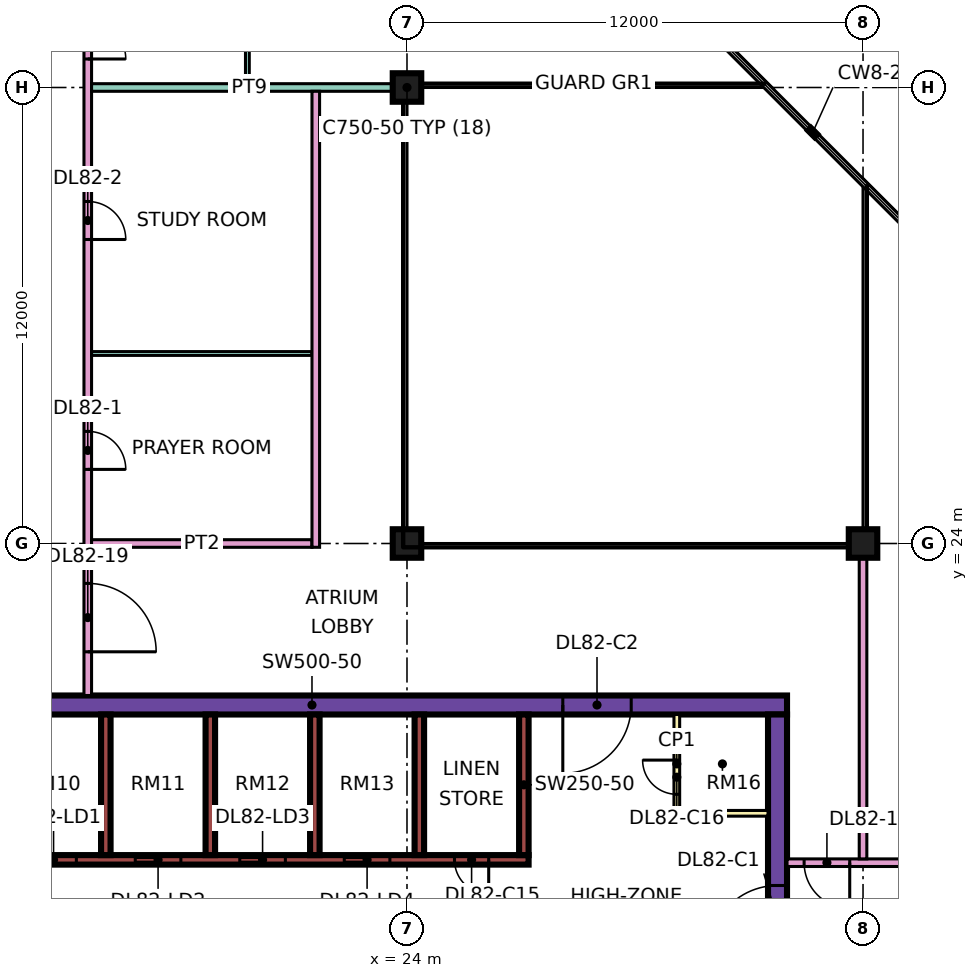
"""IFC4 building model, lengths in metres.
Left out: names, types, materials, properties, quantities, classifications, styles, units other than length and angle.
Written with IfcOpenShell. Run it as: python <this file> out.ifc"""

import sys

from ifc_helpers import new_model, si_unit, direction, frame, frame_2d, origin, origin_2d, place, context, subcontext, project, spatial, rectangle, extrude, element, fill, save


model = new_model("IFC4")
c1 = context("Model", 3, precision=1e-05, world=origin(), true_north=direction((0.0, 1.0)))
c2 = subcontext(c1, "Body", "Model", "MODEL_VIEW")
j1 = project(units=[si_unit("LENGTHUNIT", "METRE"), si_unit("PLANEANGLEUNIT", "RADIAN")], contexts=[c1])
p1 = place(None, origin())
s1 = spatial("IfcSite", under=j1, at=p1, CompositionType="ELEMENT")
p2 = place(p1, origin())
s2 = spatial("IfcBuilding", under=s1, at=p2, CompositionType="ELEMENT")
p3 = place(p2, frame((0.0, 0.0, 353.9)))
s3 = spatial("IfcBuildingStorey", under=s2, at=p3, CompositionType="ELEMENT", Elevation=353.9)
for number, where, z_axis, x_axis in (
    (1, (24.0, 24.0, 0.0), (0.0, 0.0, 1.0), (1.0, 0.0, 0.0)),
    (2, (24.0, 36.0, 0.0), (0.0, 0.0, 1.0), (1.0, 0.0, 0.0)),
    (3, (36.0, 24.0, 0.0), (0.0, 0.0, 1.0), (1.0, 0.0, 0.0)),
):
    element("IfcColumn", number, at=place(p3, frame(where, z_axis=z_axis, x_axis=x_axis)), inside=s3, PredefinedType="COLUMN", context=c2, shape_type="SweptSolid", body=[
        extrude(rectangle(XDim=0.75, YDim=0.75, at=origin_2d()), origin(), (0.0, 0.0, 1.0), 3.75),
    ])
p4 = place(p3, frame((9.0, 19.75, 0.0), z_axis=(0.0, 0.0, 1.0), x_axis=(1.0, 0.0, 0.0)))
e4 = element("IfcWall", 4, at=p4, inside=s3, PredefinedType="SHEAR", context=c2, shape_type="SweptSolid", body=[
    extrude(rectangle(XDim=25.0, YDim=0.5, at=frame_2d((12.5, 0.0))), origin(), (0.0, 0.0, 1.0), 3.75),
])
p5 = place(p4, frame((19.1, 0.0, 0.0)))
e5 = element("IfcOpeningElement", 5, at=p5, cuts=e4, PredefinedType="OPENING", context=c2, shape_type="SweptSolid", body=[
    extrude(rectangle(XDim=1.8, YDim=2.4, at=frame_2d((0.9, 1.2))), frame((0.0, 0.26, 0.0), z_axis=(0.0, -1.0, 0.0), x_axis=(1.0, 0.0, 0.0)), (0.0, 0.0, 1.0), 0.52),
])
p6 = place(p3, frame((33.75, 7.5, 0.0), z_axis=(0.0, 0.0, 1.0), x_axis=(0.0, 1.0, 0.0)))
e6 = element("IfcWall", 6, at=p6, inside=s3, PredefinedType="SHEAR", context=c2, shape_type="SweptSolid", body=[
    extrude(rectangle(XDim=12.0, YDim=0.5, at=frame_2d((6.0, 0.0))), origin(), (0.0, 0.0, 1.0), 3.75),
])
p7 = place(p6, frame((5.7, 0.0, 0.0)))
e7 = element("IfcOpeningElement", 7, at=p7, cuts=e6, PredefinedType="OPENING", context=c2, shape_type="SweptSolid", body=[
    extrude(rectangle(XDim=1.8, YDim=2.4, at=frame_2d((0.9, 1.2))), frame((0.0, 0.26, 0.0), z_axis=(0.0, -1.0, 0.0), x_axis=(1.0, 0.0, 0.0)), (0.0, 0.0, 1.0), 0.52),
])
p8 = place(p3, frame((13.45, 15.675, 0.0), z_axis=(0.0, 0.0, 1.0), x_axis=(1.0, 0.0, 0.0)))
e8 = element("IfcWall", 8, at=p8, inside=s3, PredefinedType="SHEAR", context=c2, shape_type="SweptSolid", body=[
    extrude(rectangle(XDim=13.75, YDim=0.25, at=frame_2d((6.875, 0.0))), origin(), (0.0, 0.0, 1.0), 3.75),
])
p9 = place(p8, frame((0.65, 0.0, 0.0)))
e9 = element("IfcOpeningElement", 9, at=p9, cuts=e8, PredefinedType="OPENING", context=c2, shape_type="SweptSolid", body=[
    extrude(rectangle(XDim=1.2, YDim=2.2, at=frame_2d((0.6, 1.1))), frame((0.0, 0.135, 0.0), z_axis=(0.0, -1.0, 0.0), x_axis=(1.0, 0.0, 0.0)), (0.0, 0.0, 1.0), 0.27),
])
p10 = place(p8, frame((3.4, 0.0, 0.0)))
e10 = element("IfcOpeningElement", 10, at=p10, cuts=e8, PredefinedType="OPENING", context=c2, shape_type="SweptSolid", body=[
    extrude(rectangle(XDim=1.2, YDim=2.2, at=frame_2d((0.6, 1.1))), frame((0.0, 0.135, 0.0), z_axis=(0.0, -1.0, 0.0), x_axis=(1.0, 0.0, 0.0)), (0.0, 0.0, 1.0), 0.27),
])
p11 = place(p8, frame((6.15, 0.0, 0.0)))
e11 = element("IfcOpeningElement", 11, at=p11, cuts=e8, PredefinedType="OPENING", context=c2, shape_type="SweptSolid", body=[
    extrude(rectangle(XDim=1.2, YDim=2.2, at=frame_2d((0.6, 1.1))), frame((0.0, 0.135, 0.0), z_axis=(0.0, -1.0, 0.0), x_axis=(1.0, 0.0, 0.0)), (0.0, 0.0, 1.0), 0.27),
])
p12 = place(p8, frame((8.9, 0.0, 0.0)))
e12 = element("IfcOpeningElement", 12, at=p12, cuts=e8, PredefinedType="OPENING", context=c2, shape_type="SweptSolid", body=[
    extrude(rectangle(XDim=1.2, YDim=2.2, at=frame_2d((0.6, 1.1))), frame((0.0, 0.135, 0.0), z_axis=(0.0, -1.0, 0.0), x_axis=(1.0, 0.0, 0.0)), (0.0, 0.0, 1.0), 0.27),
])
p13 = place(p8, frame((11.8, 0.0, 0.0)))
e13 = element("IfcOpeningElement", 13, at=p13, cuts=e8, PredefinedType="OPENING", context=c2, shape_type="SweptSolid", body=[
    extrude(rectangle(XDim=0.9, YDim=2.1, at=frame_2d((0.45, 1.05))), frame((0.0, 0.135, 0.0), z_axis=(0.0, -1.0, 0.0), x_axis=(1.0, 0.0, 0.0)), (0.0, 0.0, 1.0), 0.27),
])
for number, where, z_axis, x_axis in (
    (14, (16.075, 15.8, 0.0), (0.0, 0.0, 1.0), (0.0, 1.0, 0.0)),
    (15, (18.825, 15.8, 0.0), (0.0, 0.0, 1.0), (0.0, 1.0, 0.0)),
    (16, (21.575, 15.8, 0.0), (0.0, 0.0, 1.0), (0.0, 1.0, 0.0)),
    (17, (24.325, 15.8, 0.0), (0.0, 0.0, 1.0), (0.0, 1.0, 0.0)),
    (18, (27.075, 15.8, 0.0), (0.0, 0.0, 1.0), (0.0, 1.0, 0.0)),
):
    element("IfcWall", number, at=place(p3, frame(where, z_axis=z_axis, x_axis=x_axis)), inside=s3, PredefinedType="SHEAR", context=c2, shape_type="SweptSolid", body=[
        extrude(rectangle(XDim=3.7, YDim=0.25, at=frame_2d((1.85, 0.0))), origin(), (0.0, 0.0, 1.0), 3.75),
    ])
p14 = place(p3, frame((31.1, 16.9, 0.0), z_axis=(0.0, 0.0, 1.0), x_axis=(0.0, 1.0, 0.0)))
e19 = element("IfcWall", 19, at=p14, inside=s3, PredefinedType="PARTITIONING", context=c2, shape_type="SweptSolid", body=[
    extrude(rectangle(XDim=2.6, YDim=0.15, at=frame_2d((1.3, 0.0))), origin(), (0.0, 0.0, 1.0), 3.35),
])
p15 = place(p14, frame((0.5, 0.0, 0.0)))
e20 = element("IfcOpeningElement", 20, at=p15, cuts=e19, PredefinedType="OPENING", context=c2, shape_type="SweptSolid", body=[
    extrude(rectangle(XDim=0.9, YDim=2.1, at=frame_2d((0.45, 1.05))), frame((0.0, 0.085, 0.0), z_axis=(0.0, -1.0, 0.0), x_axis=(1.0, 0.0, 0.0)), (0.0, 0.0, 1.0), 0.17),
])
p16 = place(p3, frame((31.1, 16.9, 0.0), z_axis=(0.0, 0.0, 1.0), x_axis=(1.0, 0.0, 0.0)))
e21 = element("IfcWall", 21, at=p16, inside=s3, PredefinedType="PARTITIONING", context=c2, shape_type="SweptSolid", body=[
    extrude(rectangle(XDim=2.4, YDim=0.15, at=frame_2d((1.2, 0.0))), origin(), (0.0, 0.0, 1.0), 3.35),
])
p17 = place(p3, frame((15.6, 20.0, 0.0), z_axis=(0.0, 0.0, 1.0), x_axis=(0.0, 1.0, 0.0)))
e22 = element("IfcWall", 22, at=p17, inside=s3, PredefinedType="PARTITIONING", context=c2, shape_type="SweptSolid", body=[
    extrude(rectangle(XDim=27.775, YDim=0.2, at=frame_2d((13.887, 0.0))), origin(), (0.0, 0.0, 1.0), 3.35),
])
p18 = place(p17, frame((5.95, 0.0, 0.0)))
e23 = element("IfcOpeningElement", 23, at=p18, cuts=e22, PredefinedType="OPENING", context=c2, shape_type="SweptSolid", body=[
    extrude(rectangle(XDim=1.0, YDim=2.1, at=frame_2d((0.5, 1.05))), frame((0.0, 0.11, 0.0), z_axis=(0.0, -1.0, 0.0), x_axis=(1.0, 0.0, 0.0)), (0.0, 0.0, 1.0), 0.22),
])
p19 = place(p17, frame((12.0, 0.0, 0.0)))
e24 = element("IfcOpeningElement", 24, at=p19, cuts=e22, PredefinedType="OPENING", context=c2, shape_type="SweptSolid", body=[
    extrude(rectangle(XDim=1.0, YDim=2.1, at=frame_2d((0.5, 1.05))), frame((0.0, 0.11, 0.0), z_axis=(0.0, -1.0, 0.0), x_axis=(1.0, 0.0, 0.0)), (0.0, 0.0, 1.0), 0.22),
])
p20 = place(p17, frame((16.75, 0.0, 0.0)))
e25 = element("IfcOpeningElement", 25, at=p20, cuts=e22, PredefinedType="OPENING", context=c2, shape_type="SweptSolid", body=[
    extrude(rectangle(XDim=1.0, YDim=2.1, at=frame_2d((0.5, 1.05))), frame((0.0, 0.11, 0.0), z_axis=(0.0, -1.0, 0.0), x_axis=(1.0, 0.0, 0.0)), (0.0, 0.0, 1.0), 0.22),
])
p21 = place(p17, frame((1.15, 0.0, 0.0)))
e26 = element("IfcOpeningElement", 26, at=p21, cuts=e22, PredefinedType="OPENING", context=c2, shape_type="SweptSolid", body=[
    extrude(rectangle(XDim=1.8, YDim=2.1, at=frame_2d((0.9, 1.05))), frame((0.0, 0.11, 0.0), z_axis=(0.0, -1.0, 0.0), x_axis=(1.0, 0.0, 0.0)), (0.0, 0.0, 1.0), 0.22),
])
p22 = place(p17, frame((25.9, 0.0, 0.0)))
e27 = element("IfcOpeningElement", 27, at=p22, cuts=e22, PredefinedType="OPENING", context=c2, shape_type="SweptSolid", body=[
    extrude(rectangle(XDim=1.0, YDim=2.1, at=frame_2d((0.5, 1.05))), frame((0.0, 0.11, 0.0), z_axis=(0.0, -1.0, 0.0), x_axis=(1.0, 0.0, 0.0)), (0.0, 0.0, 1.0), 0.22),
])
p23 = place(p3, frame((15.7, 24.0, 0.0), z_axis=(0.0, 0.0, 1.0), x_axis=(1.0, 0.0, 0.0)))
e28 = element("IfcWall", 28, at=p23, inside=s3, PredefinedType="PARTITIONING", context=c2, shape_type="SweptSolid", body=[
    extrude(rectangle(XDim=5.8, YDim=0.2, at=frame_2d((2.9, 0.0))), origin(), (0.0, 0.0, 1.0), 3.35),
])
p24 = place(p3, frame((15.7, 29.0, 0.0), z_axis=(0.0, 0.0, 1.0), x_axis=(1.0, 0.0, 0.0)))
e29 = element("IfcWall", 29, at=p24, inside=s3, PredefinedType="PARTITIONING", context=c2, shape_type="SweptSolid", body=[
    extrude(rectangle(XDim=5.8, YDim=0.1, at=frame_2d((2.9, 0.0))), origin(), (0.0, 0.0, 1.0), 3.35),
])
p25 = place(p3, frame((15.7, 36.0, 0.0), z_axis=(0.0, 0.0, 1.0), x_axis=(1.0, 0.0, 0.0)))
e30 = element("IfcWall", 30, at=p25, inside=s3, PredefinedType="PARTITIONING", context=c2, shape_type="SweptSolid", body=[
    extrude(rectangle(XDim=8.3, YDim=0.2, at=frame_2d((4.15, 0.0))), origin(), (0.0, 0.0, 1.0), 3.35),
])
p26 = place(p3, frame((19.8, 36.1, 0.0), z_axis=(0.0, 0.0, 1.0), x_axis=(0.0, 1.0, 0.0)))
e31 = element("IfcWall", 31, at=p26, inside=s3, PredefinedType="PARTITIONING", context=c2, shape_type="SweptSolid", body=[
    extrude(rectangle(XDim=2.85, YDim=0.1, at=frame_2d((1.425, 0.0))), origin(), (0.0, 0.0, 1.0), 3.35),
])
p27 = place(p3, frame((21.6, 23.9, 0.0), z_axis=(0.0, 0.0, 1.0), x_axis=(0.0, 1.0, 0.0)))
e32 = element("IfcWall", 32, at=p27, inside=s3, PredefinedType="PARTITIONING", context=c2, shape_type="SweptSolid", body=[
    extrude(rectangle(XDim=12.0, YDim=0.2, at=frame_2d((6.0, 0.0))), origin(), (0.0, 0.0, 1.0), 3.35),
])
p28 = place(p3, frame((34.0, 15.6, 0.0), z_axis=(0.0, 0.0, 1.0), x_axis=(1.0, 0.0, 0.0)))
e33 = element("IfcWall", 33, at=p28, inside=s3, PredefinedType="PARTITIONING", context=c2, shape_type="SweptSolid", body=[
    extrude(rectangle(XDim=10.35, YDim=0.2, at=frame_2d((5.175, 0.0))), origin(), (0.0, 0.0, 1.0), 3.35),
])
p29 = place(p28, frame((5.6, 0.0, 0.0)))
e34 = element("IfcOpeningElement", 34, at=p29, cuts=e33, PredefinedType="OPENING", context=c2, shape_type="SweptSolid", body=[
    extrude(rectangle(XDim=1.0, YDim=2.1, at=frame_2d((0.5, 1.05))), frame((0.0, 0.11, 0.0), z_axis=(0.0, -1.0, 0.0), x_axis=(1.0, 0.0, 0.0)), (0.0, 0.0, 1.0), 0.22),
])
p30 = place(p28, frame((0.45, 0.0, 0.0)))
e35 = element("IfcOpeningElement", 35, at=p30, cuts=e33, PredefinedType="OPENING", context=c2, shape_type="SweptSolid", body=[
    extrude(rectangle(XDim=1.2, YDim=2.1, at=frame_2d((0.6, 1.05))), frame((0.0, 0.11, 0.0), z_axis=(0.0, -1.0, 0.0), x_axis=(1.0, 0.0, 0.0)), (0.0, 0.0, 1.0), 0.22),
])
p31 = place(p3, frame((36.0, 15.7, 0.0), z_axis=(0.0, 0.0, 1.0), x_axis=(0.0, 1.0, 0.0)))
e36 = element("IfcWall", 36, at=p31, inside=s3, PredefinedType="PARTITIONING", context=c2, shape_type="SweptSolid", body=[
    extrude(rectangle(XDim=8.3, YDim=0.2, at=frame_2d((4.15, 0.0))), origin(), (0.0, 0.0, 1.0), 3.35),
])
p32 = place(p9, origin())
e37 = element("IfcDoor", 37, at=p32, inside=s3, OperationType="DOUBLE_DOOR_SLIDING", PredefinedType="DOOR", context=c2, shape_type="SweptSolid", body=[
    extrude(rectangle(XDim=1.2, YDim=2.2, at=frame_2d((0.6, 1.1))), frame((0.0, 0.025, 0.0), z_axis=(0.0, -1.0, 0.0), x_axis=(1.0, 0.0, 0.0)), (0.0, 0.0, 1.0), 0.05),
])
fill(e9, e37)
p33 = place(p10, origin())
e38 = element("IfcDoor", 38, at=p33, inside=s3, OperationType="DOUBLE_DOOR_SLIDING", PredefinedType="DOOR", context=c2, shape_type="SweptSolid", body=[
    extrude(rectangle(XDim=1.2, YDim=2.2, at=frame_2d((0.6, 1.1))), frame((0.0, 0.025, 0.0), z_axis=(0.0, -1.0, 0.0), x_axis=(1.0, 0.0, 0.0)), (0.0, 0.0, 1.0), 0.05),
])
fill(e10, e38)
p34 = place(p11, origin())
e39 = element("IfcDoor", 39, at=p34, inside=s3, OperationType="DOUBLE_DOOR_SLIDING", PredefinedType="DOOR", context=c2, shape_type="SweptSolid", body=[
    extrude(rectangle(XDim=1.2, YDim=2.2, at=frame_2d((0.6, 1.1))), frame((0.0, 0.025, 0.0), z_axis=(0.0, -1.0, 0.0), x_axis=(1.0, 0.0, 0.0)), (0.0, 0.0, 1.0), 0.05),
])
fill(e11, e39)
p35 = place(p12, origin())
e40 = element("IfcDoor", 40, at=p35, inside=s3, OperationType="DOUBLE_DOOR_SLIDING", PredefinedType="DOOR", context=c2, shape_type="SweptSolid", body=[
    extrude(rectangle(XDim=1.2, YDim=2.2, at=frame_2d((0.6, 1.1))), frame((0.0, 0.025, 0.0), z_axis=(0.0, -1.0, 0.0), x_axis=(1.0, 0.0, 0.0)), (0.0, 0.0, 1.0), 0.05),
])
fill(e12, e40)
p36 = place(p7, origin())
e41 = element("IfcDoor", 41, at=p36, inside=s3, OperationType="DOUBLE_DOOR_SINGLE_SWING", PredefinedType="DOOR", context=c2, shape_type="SweptSolid", body=[
    extrude(rectangle(XDim=1.8, YDim=2.4, at=frame_2d((0.9, 1.2))), frame((0.0, 0.025, 0.0), z_axis=(0.0, -1.0, 0.0), x_axis=(1.0, 0.0, 0.0)), (0.0, 0.0, 1.0), 0.05),
])
fill(e7, e41)
p37 = place(p5, frame((1.8, 0.0, 0.0), z_axis=(0.0, 0.0, 1.0), x_axis=(-1.0, 0.0, 0.0)))
e42 = element("IfcDoor", 42, at=p37, inside=s3, OperationType="DOUBLE_DOOR_SINGLE_SWING", PredefinedType="DOOR", context=c2, shape_type="SweptSolid", body=[
    extrude(rectangle(XDim=1.8, YDim=2.4, at=frame_2d((0.9, 1.2))), frame((0.0, 0.025, 0.0), z_axis=(0.0, -1.0, 0.0), x_axis=(1.0, 0.0, 0.0)), (0.0, 0.0, 1.0), 0.05),
])
fill(e5, e42)
p38 = place(p13, origin())
e43 = element("IfcDoor", 43, at=p38, inside=s3, OperationType="SINGLE_SWING_RIGHT", PredefinedType="DOOR", context=c2, shape_type="SweptSolid", body=[
    extrude(rectangle(XDim=0.9, YDim=2.1, at=frame_2d((0.45, 1.05))), frame((0.0, 0.025, 0.0), z_axis=(0.0, -1.0, 0.0), x_axis=(1.0, 0.0, 0.0)), (0.0, 0.0, 1.0), 0.05),
])
fill(e13, e43)
p39 = place(p15, frame((0.9, 0.0, 0.0), z_axis=(0.0, 0.0, 1.0), x_axis=(-1.0, 0.0, 0.0)))
e44 = element("IfcDoor", 44, at=p39, inside=s3, OperationType="SINGLE_SWING_RIGHT", PredefinedType="DOOR", context=c2, shape_type="SweptSolid", body=[
    extrude(rectangle(XDim=0.9, YDim=2.1, at=frame_2d((0.45, 1.05))), frame((0.0, 0.025, 0.0), z_axis=(0.0, -1.0, 0.0), x_axis=(1.0, 0.0, 0.0)), (0.0, 0.0, 1.0), 0.05),
])
fill(e20, e44)
p40 = place(p18, frame((1.0, 0.0, 0.0), z_axis=(0.0, 0.0, 1.0), x_axis=(-1.0, 0.0, 0.0)))
e45 = element("IfcDoor", 45, at=p40, inside=s3, OperationType="SINGLE_SWING_LEFT", PredefinedType="DOOR", context=c2, shape_type="SweptSolid", body=[
    extrude(rectangle(XDim=1.0, YDim=2.1, at=frame_2d((0.5, 1.05))), frame((0.0, 0.025, 0.0), z_axis=(0.0, -1.0, 0.0), x_axis=(1.0, 0.0, 0.0)), (0.0, 0.0, 1.0), 0.05),
])
fill(e23, e45)
p41 = place(p19, frame((1.0, 0.0, 0.0), z_axis=(0.0, 0.0, 1.0), x_axis=(-1.0, 0.0, 0.0)))
e46 = element("IfcDoor", 46, at=p41, inside=s3, OperationType="SINGLE_SWING_LEFT", PredefinedType="DOOR", context=c2, shape_type="SweptSolid", body=[
    extrude(rectangle(XDim=1.0, YDim=2.1, at=frame_2d((0.5, 1.05))), frame((0.0, 0.025, 0.0), z_axis=(0.0, -1.0, 0.0), x_axis=(1.0, 0.0, 0.0)), (0.0, 0.0, 1.0), 0.05),
])
fill(e24, e46)
p42 = place(p20, frame((1.0, 0.0, 0.0), z_axis=(0.0, 0.0, 1.0), x_axis=(-1.0, 0.0, 0.0)))
e47 = element("IfcDoor", 47, at=p42, inside=s3, OperationType="SINGLE_SWING_LEFT", PredefinedType="DOOR", context=c2, shape_type="SweptSolid", body=[
    extrude(rectangle(XDim=1.0, YDim=2.1, at=frame_2d((0.5, 1.05))), frame((0.0, 0.025, 0.0), z_axis=(0.0, -1.0, 0.0), x_axis=(1.0, 0.0, 0.0)), (0.0, 0.0, 1.0), 0.05),
])
fill(e25, e47)
p43 = place(p30, origin())
e48 = element("IfcDoor", 48, at=p43, inside=s3, OperationType="SINGLE_SWING_RIGHT", PredefinedType="DOOR", context=c2, shape_type="SweptSolid", body=[
    extrude(rectangle(XDim=1.2, YDim=2.1, at=frame_2d((0.6, 1.05))), frame((0.0, 0.025, 0.0), z_axis=(0.0, -1.0, 0.0), x_axis=(1.0, 0.0, 0.0)), (0.0, 0.0, 1.0), 0.05),
])
fill(e35, e48)
p44 = place(p21, frame((1.8, 0.0, 0.0), z_axis=(0.0, 0.0, 1.0), x_axis=(-1.0, 0.0, 0.0)))
e49 = element("IfcDoor", 49, at=p44, inside=s3, OperationType="DOUBLE_DOOR_SINGLE_SWING", PredefinedType="DOOR", context=c2, shape_type="SweptSolid", body=[
    extrude(rectangle(XDim=1.8, YDim=2.1, at=frame_2d((0.9, 1.05))), frame((0.0, 0.025, 0.0), z_axis=(0.0, -1.0, 0.0), x_axis=(1.0, 0.0, 0.0)), (0.0, 0.0, 1.0), 0.05),
])
fill(e26, e49)
save(model, sys.argv[1])
